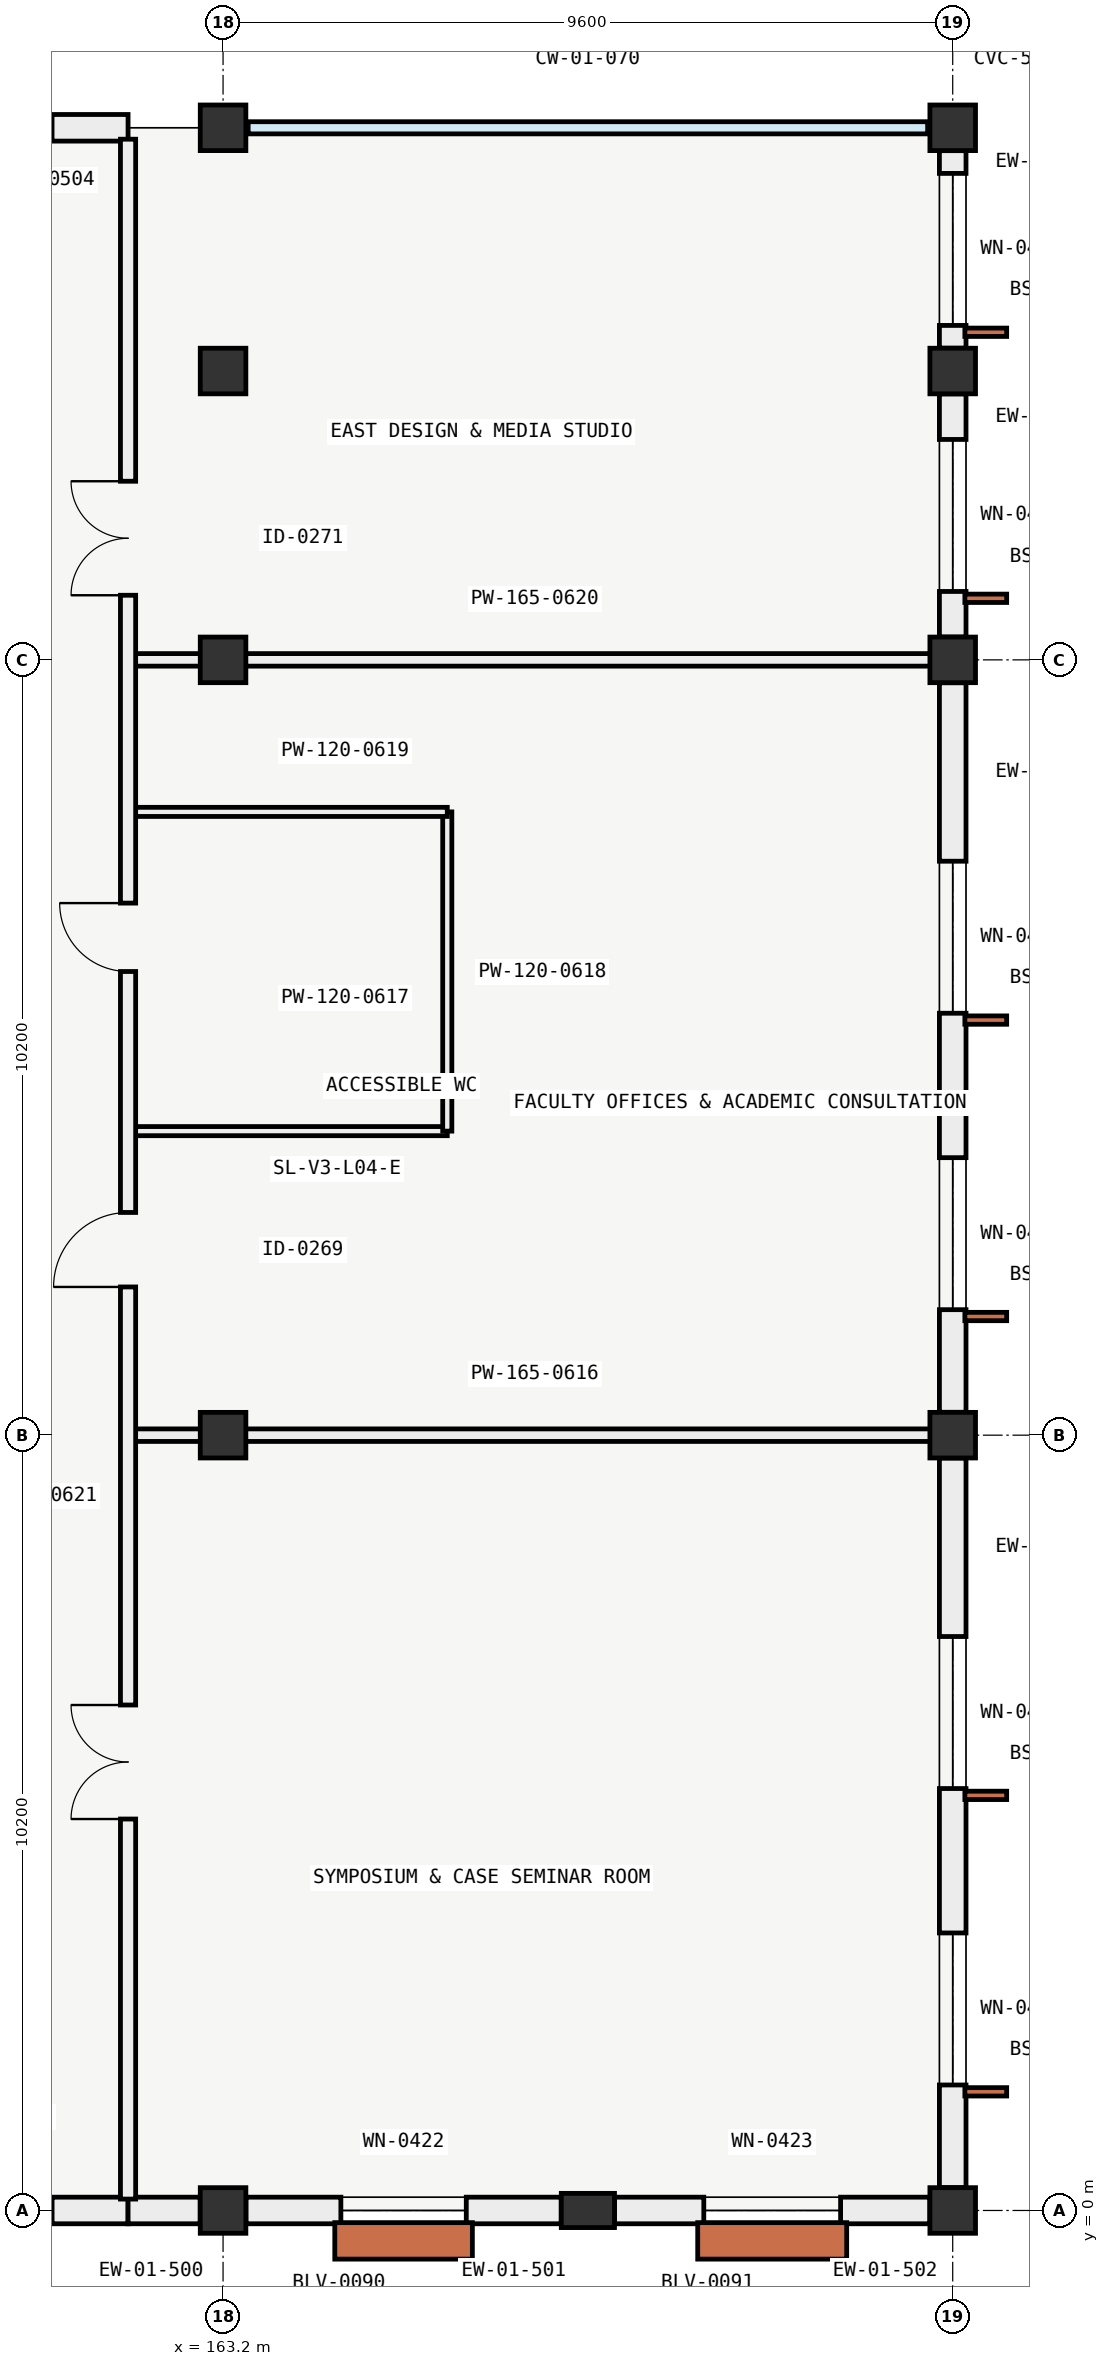
"""IFC4 building model, lengths in metres.
Left out: names, types, materials, properties, quantities, classifications, styles, units other than length and angle.
Written with IfcOpenShell. Run it as: python <this file> out.ifc"""

import sys

from ifc_helpers import new_model, si_unit, direction, frame, frame_2d, origin, origin_2d, place, context, subcontext, project, spatial, rectangle, extrude, element, fill, save


model = new_model("IFC4")
c1 = context("Model", 3, precision=1e-05, world=origin(), true_north=direction((0.0, 1.0)))
c2 = subcontext(c1, "Body", "Model", "MODEL_VIEW")
j1 = project(units=[si_unit("LENGTHUNIT", "METRE"), si_unit("PLANEANGLEUNIT", "RADIAN")], contexts=[c1])
p1 = place(None, origin())
s1 = spatial("IfcSite", under=j1, at=p1, CompositionType="ELEMENT")
p2 = place(p1, origin())
s2 = spatial("IfcBuilding", under=s1, at=p2, CompositionType="ELEMENT")
p3 = place(p2, frame((0.0, 0.0, 18.0)))
s3 = spatial("IfcBuildingStorey", under=s2, at=p3, CompositionType="ELEMENT", Elevation=18.0)
for number, where, z_axis, x_axis in (
    (1, (163.2, 0.0, 0.0), (0.0, 0.0, 1.0), (1.0, 0.0, 0.0)),
    (2, (163.2, 10.2, 0.0), (0.0, 0.0, 1.0), (1.0, 0.0, 0.0)),
    (3, (163.2, 20.4, 0.0), (0.0, 0.0, 1.0), (1.0, 0.0, 0.0)),
    (4, (163.2, 24.2, 0.0), (0.0, 0.0, 1.0), (1.0, 0.0, 0.0)),
    (5, (163.2, 27.4, 0.0), (0.0, 0.0, 1.0), (1.0, 0.0, 0.0)),
    (6, (172.8, 0.0, 0.0), (0.0, 0.0, 1.0), (1.0, 0.0, 0.0)),
    (7, (172.8, 10.2, 0.0), (0.0, 0.0, 1.0), (1.0, 0.0, 0.0)),
    (8, (172.8, 20.4, 0.0), (0.0, 0.0, 1.0), (1.0, 0.0, 0.0)),
    (9, (172.8, 24.2, 0.0), (0.0, 0.0, 1.0), (1.0, 0.0, 0.0)),
    (10, (172.8, 27.4, 0.0), (0.0, 0.0, 1.0), (1.0, 0.0, 0.0)),
):
    element("IfcColumn", number, at=place(p3, frame(where, z_axis=z_axis, x_axis=x_axis)), inside=s3, PredefinedType="COLUMN", context=c2, shape_type="SweptSolid", body=[
        extrude(rectangle(XDim=0.6, YDim=0.6, at=origin_2d()), origin(), (0.0, 0.0, 1.0), 4.2),
    ])
p4 = place(p3, frame((168.0, 0.0, 0.0), z_axis=(0.0, 0.0, 1.0), x_axis=(0.0, 1.0, 0.0)))
e11 = element("IfcColumn", 11, at=p4, inside=s3, PredefinedType="PILASTER", context=c2, shape_type="SweptSolid", body=[
    extrude(rectangle(XDim=0.45, YDim=0.7, at=origin_2d()), origin(), (0.0, 0.0, 1.0), 4.2),
])
p5 = place(p3, frame((161.95, 0.0, 0.0), z_axis=(0.0, 0.0, 1.0), x_axis=(-1.0, 0.0, 0.0)))
e12 = element("IfcWall", 12, at=p5, inside=s3, PredefinedType="SOLIDWALL", context=c2, shape_type="SweptSolid", body=[
    extrude(rectangle(XDim=3.199, YDim=0.35, at=frame_2d((1.6, 0.0))), origin(), (0.0, 0.0, 1.0), 3.3),
])
p6 = place(p5, frame((1.0, 0.0, 0.75)))
e13 = element("IfcOpeningElement", 13, at=p6, cuts=e12, PredefinedType="OPENING", context=c2, shape_type="SweptSolid", body=[
    extrude(rectangle(XDim=1.2, YDim=2.4, at=frame_2d((0.6, 1.2))), frame((0.0, 0.185, 0.0), z_axis=(0.0, -1.0, 0.0), x_axis=(1.0, 0.0, 0.0)), (0.0, 0.0, 1.0), 0.37),
])
p7 = place(p3, frame((162.899, 0.0, 0.0), z_axis=(0.0, 0.0, 1.0), x_axis=(-1.0, 0.0, 0.0)))
e14 = element("IfcWall", 14, at=p7, inside=s3, PredefinedType="SOLIDWALL", context=c2, shape_type="SweptSolid", body=[
    extrude(rectangle(XDim=0.949, YDim=0.35, at=frame_2d((0.475, 0.0))), origin(), (0.0, 0.0, 1.0), 3.3),
])
p8 = place(p3, frame((167.649, 0.0, 0.0), z_axis=(0.0, 0.0, 1.0), x_axis=(-1.0, 0.0, 0.0)))
e15 = element("IfcWall", 15, at=p8, inside=s3, PredefinedType="SOLIDWALL", context=c2, shape_type="SweptSolid", body=[
    extrude(rectangle(XDim=4.148, YDim=0.35, at=frame_2d((2.074, 0.0))), origin(), (0.0, 0.0, 1.0), 3.3),
])
p9 = place(p8, frame((1.249, 0.0, 0.85)))
e16 = element("IfcOpeningElement", 16, at=p9, cuts=e15, PredefinedType="OPENING", context=c2, shape_type="SweptSolid", body=[
    extrude(rectangle(XDim=1.65, YDim=2.0, at=frame_2d((0.825, 1.0))), frame((0.0, 0.185, 0.0), z_axis=(0.0, -1.0, 0.0), x_axis=(1.0, 0.0, 0.0)), (0.0, 0.0, 1.0), 0.37),
])
p10 = place(p3, frame((172.499, 0.0, 0.0), z_axis=(0.0, 0.0, 1.0), x_axis=(-1.0, 0.0, 0.0)))
e17 = element("IfcWall", 17, at=p10, inside=s3, PredefinedType="SOLIDWALL", context=c2, shape_type="SweptSolid", body=[
    extrude(rectangle(XDim=4.148, YDim=0.35, at=frame_2d((2.074, 0.0))), origin(), (0.0, 0.0, 1.0), 3.3),
])
p11 = place(p10, frame((1.174, 0.0, 0.85)))
e18 = element("IfcOpeningElement", 18, at=p11, cuts=e17, PredefinedType="OPENING", context=c2, shape_type="SweptSolid", body=[
    extrude(rectangle(XDim=1.8, YDim=2.1, at=frame_2d((0.9, 1.05))), frame((0.0, 0.185, 0.0), z_axis=(0.0, -1.0, 0.0), x_axis=(1.0, 0.0, 0.0)), (0.0, 0.0, 1.0), 0.37),
])
p12 = place(p3, frame((172.8, 9.899, 0.0), z_axis=(0.0, 0.0, 1.0), x_axis=(0.0, -1.0, 0.0)))
e19 = element("IfcWall", 19, at=p12, inside=s3, PredefinedType="SOLIDWALL", context=c2, shape_type="SweptSolid", body=[
    extrude(rectangle(XDim=9.598, YDim=0.35, at=frame_2d((4.799, 0.0))), origin(), (0.0, 0.0, 1.0), 3.3),
])
p13 = place(p12, frame((6.248, 0.0, 0.85)))
e20 = element("IfcOpeningElement", 20, at=p13, cuts=e19, PredefinedType="OPENING", context=c2, shape_type="SweptSolid", body=[
    extrude(rectangle(XDim=2.0, YDim=1.35, at=frame_2d((1.0, 0.675))), frame((0.0, 0.185, 0.0), z_axis=(0.0, -1.0, 0.0), x_axis=(1.0, 0.0, 0.0)), (0.0, 0.0, 1.0), 0.37),
])
p14 = place(p12, frame((2.348, 0.0, 0.85)))
e21 = element("IfcOpeningElement", 21, at=p14, cuts=e19, PredefinedType="OPENING", context=c2, shape_type="SweptSolid", body=[
    extrude(rectangle(XDim=2.0, YDim=1.35, at=frame_2d((1.0, 0.675))), frame((0.0, 0.185, 0.0), z_axis=(0.0, -1.0, 0.0), x_axis=(1.0, 0.0, 0.0)), (0.0, 0.0, 1.0), 0.37),
])
p15 = place(p3, frame((172.8, 20.099, 0.0), z_axis=(0.0, 0.0, 1.0), x_axis=(0.0, -1.0, 0.0)))
e22 = element("IfcWall", 22, at=p15, inside=s3, PredefinedType="SOLIDWALL", context=c2, shape_type="SweptSolid", body=[
    extrude(rectangle(XDim=9.598, YDim=0.35, at=frame_2d((4.799, 0.0))), origin(), (0.0, 0.0, 1.0), 3.3),
])
p16 = place(p15, frame((6.248, 0.0, 0.85)))
e23 = element("IfcOpeningElement", 23, at=p16, cuts=e22, PredefinedType="OPENING", context=c2, shape_type="SweptSolid", body=[
    extrude(rectangle(XDim=2.0, YDim=1.35, at=frame_2d((1.0, 0.675))), frame((0.0, 0.185, 0.0), z_axis=(0.0, -1.0, 0.0), x_axis=(1.0, 0.0, 0.0)), (0.0, 0.0, 1.0), 0.37),
])
p17 = place(p15, frame((2.348, 0.0, 0.85)))
e24 = element("IfcOpeningElement", 24, at=p17, cuts=e22, PredefinedType="OPENING", context=c2, shape_type="SweptSolid", body=[
    extrude(rectangle(XDim=2.0, YDim=1.35, at=frame_2d((1.0, 0.675))), frame((0.0, 0.185, 0.0), z_axis=(0.0, -1.0, 0.0), x_axis=(1.0, 0.0, 0.0)), (0.0, 0.0, 1.0), 0.37),
])
p18 = place(p3, frame((172.8, 27.099, 0.0), z_axis=(0.0, 0.0, 1.0), x_axis=(0.0, -1.0, 0.0)))
e25 = element("IfcWall", 25, at=p18, inside=s3, PredefinedType="SOLIDWALL", context=c2, shape_type="SweptSolid", body=[
    extrude(rectangle(XDim=2.598, YDim=0.35, at=frame_2d((1.299, 0.0))), origin(), (0.0, 0.0, 1.0), 3.3),
])
p19 = place(p18, frame((0.299, 0.0, 0.85)))
e26 = element("IfcOpeningElement", 26, at=p19, cuts=e25, PredefinedType="OPENING", context=c2, shape_type="SweptSolid", body=[
    extrude(rectangle(XDim=2.0, YDim=2.2, at=frame_2d((1.0, 1.1))), frame((0.0, 0.185, 0.0), z_axis=(0.0, -1.0, 0.0), x_axis=(1.0, 0.0, 0.0)), (0.0, 0.0, 1.0), 0.37),
])
p20 = place(p3, frame((172.8, 23.899, 0.0), z_axis=(0.0, 0.0, 1.0), x_axis=(0.0, -1.0, 0.0)))
e27 = element("IfcWall", 27, at=p20, inside=s3, PredefinedType="SOLIDWALL", context=c2, shape_type="SweptSolid", body=[
    extrude(rectangle(XDim=3.198, YDim=0.35, at=frame_2d((1.599, 0.0))), origin(), (0.0, 0.0, 1.0), 3.3),
])
p21 = place(p20, frame((0.599, 0.0, 0.85)))
e28 = element("IfcOpeningElement", 28, at=p21, cuts=e27, PredefinedType="OPENING", context=c2, shape_type="SweptSolid", body=[
    extrude(rectangle(XDim=2.0, YDim=1.35, at=frame_2d((1.0, 0.675))), frame((0.0, 0.185, 0.0), z_axis=(0.0, -1.0, 0.0), x_axis=(1.0, 0.0, 0.0)), (0.0, 0.0, 1.0), 0.37),
])
p22 = place(p3, frame((158.75, 27.4, 0.0), z_axis=(0.0, 0.0, 1.0), x_axis=(1.0, 0.0, 0.0)))
e29 = element("IfcWall", 29, at=p22, inside=s3, PredefinedType="SOLIDWALL", context=c2, shape_type="SweptSolid", body=[
    extrude(rectangle(XDim=3.2, YDim=0.35, at=frame_2d((1.6, 0.0))), origin(), (0.0, 0.0, 1.0), 3.3),
])
p23 = place(p22, frame((1.0, 0.0, 0.75)))
e30 = element("IfcOpeningElement", 30, at=p23, cuts=e29, PredefinedType="OPENING", context=c2, shape_type="SweptSolid", body=[
    extrude(rectangle(XDim=1.2, YDim=2.4, at=frame_2d((0.6, 1.2))), frame((0.0, 0.185, 0.0), z_axis=(0.0, -1.0, 0.0), x_axis=(1.0, 0.0, 0.0)), (0.0, 0.0, 1.0), 0.37),
])
p24 = place(p3, frame((161.95, 10.2, 0.0), z_axis=(0.0, 0.0, 1.0), x_axis=(1.0, 0.0, 0.0)))
e31 = element("IfcWall", 31, at=p24, inside=s3, PredefinedType="PARTITIONING", context=c2, shape_type="SweptSolid", body=[
    extrude(rectangle(XDim=10.7, YDim=0.165, at=frame_2d((5.35, 0.0))), origin(), (0.0, 0.0, 1.0), 3.85),
])
for number, where, z_axis, x_axis in (
    (32, (161.95, 14.2, 0.0), (0.0, 0.0, 1.0), (1.0, 0.0, 0.0)),
    (33, (166.15, 14.2, 0.0), (0.0, 0.0, 1.0), (0.0, 1.0, 0.0)),
    (34, (161.95, 18.4, 0.0), (0.0, 0.0, 1.0), (1.0, 0.0, 0.0)),
):
    element("IfcWall", number, at=place(p3, frame(where, z_axis=z_axis, x_axis=x_axis)), inside=s3, PredefinedType="PARTITIONING", context=c2, shape_type="SweptSolid", body=[
        extrude(rectangle(XDim=4.2, YDim=0.12, at=frame_2d((2.1, 0.0))), origin(), (0.0, 0.0, 1.0), 3.85),
    ])
p25 = place(p3, frame((161.95, 20.4, 0.0), z_axis=(0.0, 0.0, 1.0), x_axis=(1.0, 0.0, 0.0)))
e35 = element("IfcWall", 35, at=p25, inside=s3, PredefinedType="PARTITIONING", context=c2, shape_type="SweptSolid", body=[
    extrude(rectangle(XDim=10.7, YDim=0.165, at=frame_2d((5.35, 0.0))), origin(), (0.0, 0.0, 1.0), 3.85),
])
p26 = place(p3, frame((161.95, 0.15, 0.0), z_axis=(0.0, 0.0, 1.0), x_axis=(0.0, 1.0, 0.0)))
e36 = element("IfcWall", 36, at=p26, inside=s3, PredefinedType="PARTITIONING", context=c2, shape_type="SweptSolid", body=[
    extrude(rectangle(XDim=27.1, YDim=0.2, at=frame_2d((13.55, 0.0))), origin(), (0.0, 0.0, 1.0), 3.641),
])
p27 = place(p26, frame((5.0, 0.0, 0.0)))
e37 = element("IfcOpeningElement", 37, at=p27, cuts=e36, PredefinedType="OPENING", context=c2, shape_type="SweptSolid", body=[
    extrude(rectangle(XDim=1.5, YDim=2.2, at=frame_2d((0.75, 1.1))), frame((0.0, 0.11, 0.0), z_axis=(0.0, -1.0, 0.0), x_axis=(1.0, 0.0, 0.0)), (0.0, 0.0, 1.0), 0.22),
])
p28 = place(p26, frame((12.0, 0.0, 0.0)))
e38 = element("IfcOpeningElement", 38, at=p28, cuts=e36, PredefinedType="OPENING", context=c2, shape_type="SweptSolid", body=[
    extrude(rectangle(XDim=0.98, YDim=2.15, at=frame_2d((0.49, 1.075))), frame((0.0, 0.11, 0.0), z_axis=(0.0, -1.0, 0.0), x_axis=(1.0, 0.0, 0.0)), (0.0, 0.0, 1.0), 0.22),
])
p29 = place(p26, frame((16.15, 0.0, 0.0)))
e39 = element("IfcOpeningElement", 39, at=p29, cuts=e36, PredefinedType="OPENING", context=c2, shape_type="SweptSolid", body=[
    extrude(rectangle(XDim=0.9, YDim=2.05, at=frame_2d((0.45, 1.025))), frame((0.0, 0.11, 0.0), z_axis=(0.0, -1.0, 0.0), x_axis=(1.0, 0.0, 0.0)), (0.0, 0.0, 1.0), 0.22),
])
p30 = place(p26, frame((21.1, 0.0, 0.0)))
e40 = element("IfcOpeningElement", 40, at=p30, cuts=e36, PredefinedType="OPENING", context=c2, shape_type="SweptSolid", body=[
    extrude(rectangle(XDim=1.5, YDim=2.2, at=frame_2d((0.75, 1.1))), frame((0.0, 0.11, 0.0), z_axis=(0.0, -1.0, 0.0), x_axis=(1.0, 0.0, 0.0)), (0.0, 0.0, 1.0), 0.22),
])
p31 = place(p6, origin())
e41 = element("IfcWindow", 41, at=p31, inside=s3, PartitioningType="SINGLE_PANEL", PredefinedType="WINDOW", context=c2, shape_type="SweptSolid", body=[
    extrude(rectangle(XDim=1.2, YDim=2.4, at=frame_2d((0.6, 1.2))), frame((0.0, 0.03, 0.0), z_axis=(0.0, -1.0, 0.0), x_axis=(1.0, 0.0, 0.0)), (0.0, 0.0, 1.0), 0.06),
])
fill(e13, e41)
p32 = place(p9, origin())
e42 = element("IfcWindow", 42, at=p32, inside=s3, PartitioningType="SINGLE_PANEL", PredefinedType="WINDOW", context=c2, shape_type="SweptSolid", body=[
    extrude(rectangle(XDim=1.65, YDim=2.0, at=frame_2d((0.825, 1.0))), frame((0.0, 0.03, 0.0), z_axis=(0.0, -1.0, 0.0), x_axis=(1.0, 0.0, 0.0)), (0.0, 0.0, 1.0), 0.06),
])
fill(e16, e42)
p33 = place(p11, origin())
e43 = element("IfcWindow", 43, at=p33, inside=s3, PartitioningType="SINGLE_PANEL", PredefinedType="WINDOW", context=c2, shape_type="SweptSolid", body=[
    extrude(rectangle(XDim=1.8, YDim=2.1, at=frame_2d((0.9, 1.05))), frame((0.0, 0.03, 0.0), z_axis=(0.0, -1.0, 0.0), x_axis=(1.0, 0.0, 0.0)), (0.0, 0.0, 1.0), 0.06),
])
fill(e18, e43)
p34 = place(p13, origin())
e44 = element("IfcWindow", 44, at=p34, inside=s3, PartitioningType="SINGLE_PANEL", PredefinedType="WINDOW", context=c2, shape_type="SweptSolid", body=[
    extrude(rectangle(XDim=2.0, YDim=1.35, at=frame_2d((1.0, 0.675))), frame((0.0, 0.03, 0.0), z_axis=(0.0, -1.0, 0.0), x_axis=(1.0, 0.0, 0.0)), (0.0, 0.0, 1.0), 0.06),
])
fill(e20, e44)
p35 = place(p14, origin())
e45 = element("IfcWindow", 45, at=p35, inside=s3, PartitioningType="SINGLE_PANEL", PredefinedType="WINDOW", context=c2, shape_type="SweptSolid", body=[
    extrude(rectangle(XDim=2.0, YDim=1.35, at=frame_2d((1.0, 0.675))), frame((0.0, 0.03, 0.0), z_axis=(0.0, -1.0, 0.0), x_axis=(1.0, 0.0, 0.0)), (0.0, 0.0, 1.0), 0.06),
])
fill(e21, e45)
p36 = place(p16, origin())
e46 = element("IfcWindow", 46, at=p36, inside=s3, PartitioningType="SINGLE_PANEL", PredefinedType="WINDOW", context=c2, shape_type="SweptSolid", body=[
    extrude(rectangle(XDim=2.0, YDim=1.35, at=frame_2d((1.0, 0.675))), frame((0.0, 0.03, 0.0), z_axis=(0.0, -1.0, 0.0), x_axis=(1.0, 0.0, 0.0)), (0.0, 0.0, 1.0), 0.06),
])
fill(e23, e46)
p37 = place(p17, origin())
e47 = element("IfcWindow", 47, at=p37, inside=s3, PartitioningType="SINGLE_PANEL", PredefinedType="WINDOW", context=c2, shape_type="SweptSolid", body=[
    extrude(rectangle(XDim=2.0, YDim=1.35, at=frame_2d((1.0, 0.675))), frame((0.0, 0.03, 0.0), z_axis=(0.0, -1.0, 0.0), x_axis=(1.0, 0.0, 0.0)), (0.0, 0.0, 1.0), 0.06),
])
fill(e24, e47)
p38 = place(p19, origin())
e48 = element("IfcWindow", 48, at=p38, inside=s3, PartitioningType="SINGLE_PANEL", PredefinedType="WINDOW", context=c2, shape_type="SweptSolid", body=[
    extrude(rectangle(XDim=2.0, YDim=2.2, at=frame_2d((1.0, 1.1))), frame((0.0, 0.03, 0.0), z_axis=(0.0, -1.0, 0.0), x_axis=(1.0, 0.0, 0.0)), (0.0, 0.0, 1.0), 0.06),
])
fill(e26, e48)
p39 = place(p21, origin())
e49 = element("IfcWindow", 49, at=p39, inside=s3, PartitioningType="SINGLE_PANEL", PredefinedType="WINDOW", context=c2, shape_type="SweptSolid", body=[
    extrude(rectangle(XDim=2.0, YDim=1.35, at=frame_2d((1.0, 0.675))), frame((0.0, 0.03, 0.0), z_axis=(0.0, -1.0, 0.0), x_axis=(1.0, 0.0, 0.0)), (0.0, 0.0, 1.0), 0.06),
])
fill(e28, e49)
p40 = place(p23, origin())
e50 = element("IfcWindow", 50, at=p40, inside=s3, PartitioningType="SINGLE_PANEL", PredefinedType="WINDOW", context=c2, shape_type="SweptSolid", body=[
    extrude(rectangle(XDim=1.2, YDim=2.4, at=frame_2d((0.6, 1.2))), frame((0.0, 0.03, 0.0), z_axis=(0.0, -1.0, 0.0), x_axis=(1.0, 0.0, 0.0)), (0.0, 0.0, 1.0), 0.06),
])
fill(e30, e50)
p41 = place(p27, origin())
e51 = element("IfcDoor", 51, at=p41, inside=s3, OperationType="DOUBLE_DOOR_SINGLE_SWING", PredefinedType="DOOR", context=c2, shape_type="SweptSolid", body=[
    extrude(rectangle(XDim=1.5, YDim=2.2, at=frame_2d((0.75, 1.1))), frame((0.0, 0.025, 0.0), z_axis=(0.0, -1.0, 0.0), x_axis=(1.0, 0.0, 0.0)), (0.0, 0.0, 1.0), 0.05),
])
fill(e37, e51)
p42 = place(p28, origin())
e52 = element("IfcDoor", 52, at=p42, inside=s3, OperationType="SINGLE_SWING_LEFT", PredefinedType="DOOR", context=c2, shape_type="SweptSolid", body=[
    extrude(rectangle(XDim=0.98, YDim=2.15, at=frame_2d((0.49, 1.075))), frame((0.0, 0.025, 0.0), z_axis=(0.0, -1.0, 0.0), x_axis=(1.0, 0.0, 0.0)), (0.0, 0.0, 1.0), 0.05),
])
fill(e38, e52)
p43 = place(p29, origin())
e53 = element("IfcDoor", 53, at=p43, inside=s3, OperationType="SINGLE_SWING_RIGHT", PredefinedType="DOOR", context=c2, shape_type="SweptSolid", body=[
    extrude(rectangle(XDim=0.9, YDim=2.05, at=frame_2d((0.45, 1.025))), frame((0.0, 0.025, 0.0), z_axis=(0.0, -1.0, 0.0), x_axis=(1.0, 0.0, 0.0)), (0.0, 0.0, 1.0), 0.05),
])
fill(e39, e53)
p44 = place(p30, origin())
e54 = element("IfcDoor", 54, at=p44, inside=s3, OperationType="DOUBLE_DOOR_SINGLE_SWING", PredefinedType="DOOR", context=c2, shape_type="SweptSolid", body=[
    extrude(rectangle(XDim=1.5, YDim=2.2, at=frame_2d((0.75, 1.1))), frame((0.0, 0.025, 0.0), z_axis=(0.0, -1.0, 0.0), x_axis=(1.0, 0.0, 0.0)), (0.0, 0.0, 1.0), 0.05),
])
fill(e40, e54)
save(model, sys.argv[1])
